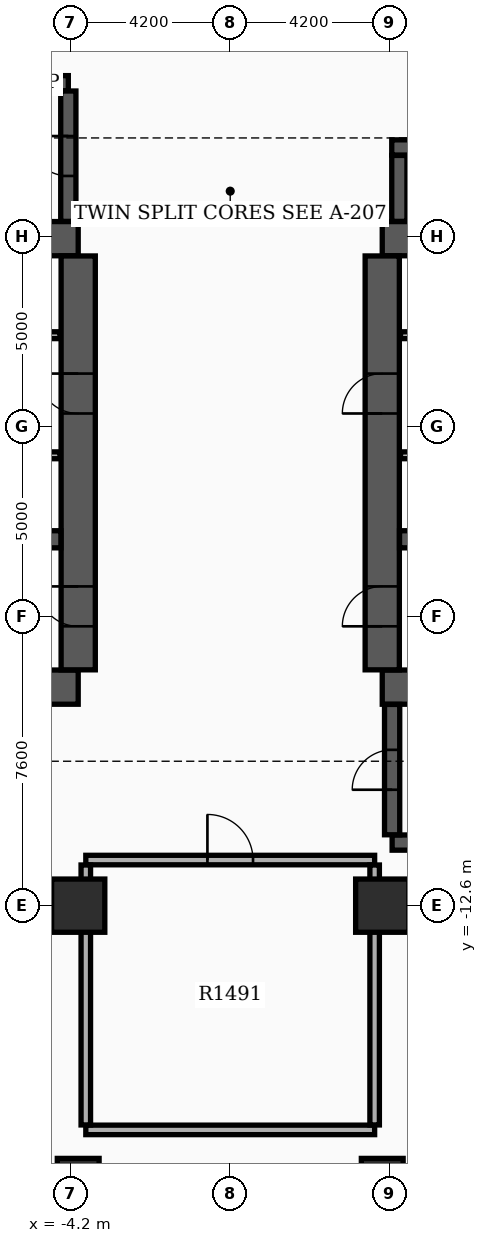
"""IFC4 building model, lengths in metres.
Left out: names, types, materials, properties, quantities, classifications, styles, units other than length and angle.
Written with IfcOpenShell. Run it as: python <this file> out.ifc"""

import sys

from ifc_helpers import new_model, si_unit, direction, frame, frame_2d, origin, origin_2d, place, context, subcontext, project, spatial, rectangle, extrude, element, fill, save


model = new_model("IFC4")
c1 = context("Model", 3, precision=1e-05, world=origin(), true_north=direction((0.0, 1.0)))
c2 = subcontext(c1, "Body", "Model", "MODEL_VIEW")
j1 = project(units=[si_unit("LENGTHUNIT", "METRE"), si_unit("PLANEANGLEUNIT", "RADIAN")], contexts=[c1])
p1 = place(None, origin())
s1 = spatial("IfcSite", under=j1, at=p1, CompositionType="ELEMENT")
p2 = place(p1, origin())
s2 = spatial("IfcBuilding", under=s1, at=p2, CompositionType="ELEMENT")
p3 = place(p2, frame((0.0, 0.0, 95.1)))
s3 = spatial("IfcBuildingStorey", under=s2, at=p3, CompositionType="ELEMENT", Elevation=95.1)
for number, where, z_axis, x_axis in (
    (1, (-12.4, -6.85, 0.0), (0.0, 0.0, 1.0), (1.0, 0.0, 0.0)),
    (2, (-12.4, 4.95, 0.0), (0.0, 0.0, 1.0), (1.0, 0.0, 0.0)),
):
    element("IfcWall", number, at=place(p3, frame(where, z_axis=z_axis, x_axis=x_axis)), inside=s3, PredefinedType="SHEAR", context=c2, shape_type="SweptSolid", body=[
        extrude(rectangle(XDim=8.4, YDim=0.9, at=frame_2d((4.2, 0.0))), origin(), (0.0, 0.0, 1.0), 4.85),
    ])
p4 = place(p3, frame((-4.0, -6.395, 0.0), z_axis=(0.0, 0.0, 1.0), x_axis=(0.0, 1.0, 0.0)))
e3 = element("IfcWall", 3, at=p4, inside=s3, PredefinedType="SHEAR", context=c2, shape_type="SweptSolid", body=[
    extrude(rectangle(XDim=10.89, YDim=0.9, at=frame_2d((5.445, 0.0))), origin(), (0.0, 0.0, 1.0), 4.85),
])
p5 = place(p4, frame((1.145, 0.0, 0.0)))
e4 = element("IfcOpeningElement", 4, at=p5, cuts=e3, PredefinedType="OPENING", context=c2, shape_type="SweptSolid", body=[
    extrude(rectangle(XDim=1.05, YDim=2.15, at=frame_2d((0.525, 1.075))), frame((0.0, 0.46, 0.0), z_axis=(0.0, -1.0, 0.0), x_axis=(1.0, 0.0, 0.0)), (0.0, 0.0, 1.0), 0.92),
])
p6 = place(p4, frame((6.745, 0.0, 0.0)))
e5 = element("IfcOpeningElement", 5, at=p6, cuts=e3, PredefinedType="OPENING", context=c2, shape_type="SweptSolid", body=[
    extrude(rectangle(XDim=1.05, YDim=2.15, at=frame_2d((0.525, 1.075))), frame((0.0, 0.46, 0.0), z_axis=(0.0, -1.0, 0.0), x_axis=(1.0, 0.0, 0.0)), (0.0, 0.0, 1.0), 0.92),
])
p7 = place(p3, frame((-11.945, -2.96, 0.0), z_axis=(0.0, 0.0, 1.0), x_axis=(1.0, 0.0, 0.0)))
e6 = element("IfcWall", 6, at=p7, inside=s3, PredefinedType="SHEAR", context=c2, shape_type="SweptSolid", body=[
    extrude(rectangle(XDim=7.49, YDim=0.45, at=frame_2d((3.745, 0.0))), origin(), (0.0, 0.0, 1.0), 4.85),
])
for number, where, z_axis, x_axis in (
    (7, (4.0, -6.85, 0.0), (0.0, 0.0, 1.0), (1.0, 0.0, 0.0)),
    (8, (4.0, 4.95, 0.0), (0.0, 0.0, 1.0), (1.0, 0.0, 0.0)),
):
    element("IfcWall", number, at=place(p3, frame(where, z_axis=z_axis, x_axis=x_axis)), inside=s3, PredefinedType="SHEAR", context=c2, shape_type="SweptSolid", body=[
        extrude(rectangle(XDim=8.4, YDim=0.9, at=frame_2d((4.2, 0.0))), origin(), (0.0, 0.0, 1.0), 4.85),
    ])
p8 = place(p3, frame((4.0, -6.395, 0.0), z_axis=(0.0, 0.0, 1.0), x_axis=(0.0, 1.0, 0.0)))
e9 = element("IfcWall", 9, at=p8, inside=s3, PredefinedType="SHEAR", context=c2, shape_type="SweptSolid", body=[
    extrude(rectangle(XDim=10.89, YDim=0.9, at=frame_2d((5.445, 0.0))), origin(), (0.0, 0.0, 1.0), 4.85),
])
p9 = place(p8, frame((1.145, 0.0, 0.0)))
e10 = element("IfcOpeningElement", 10, at=p9, cuts=e9, PredefinedType="OPENING", context=c2, shape_type="SweptSolid", body=[
    extrude(rectangle(XDim=1.05, YDim=2.15, at=frame_2d((0.525, 1.075))), frame((0.0, 0.46, 0.0), z_axis=(0.0, -1.0, 0.0), x_axis=(1.0, 0.0, 0.0)), (0.0, 0.0, 1.0), 0.92),
])
p10 = place(p8, frame((6.745, 0.0, 0.0)))
e11 = element("IfcOpeningElement", 11, at=p10, cuts=e9, PredefinedType="OPENING", context=c2, shape_type="SweptSolid", body=[
    extrude(rectangle(XDim=1.05, YDim=2.15, at=frame_2d((0.525, 1.075))), frame((0.0, 0.46, 0.0), z_axis=(0.0, -1.0, 0.0), x_axis=(1.0, 0.0, 0.0)), (0.0, 0.0, 1.0), 0.92),
])
p11 = place(p3, frame((4.455, -2.96, 0.0), z_axis=(0.0, 0.0, 1.0), x_axis=(1.0, 0.0, 0.0)))
e12 = element("IfcWall", 12, at=p11, inside=s3, PredefinedType="SHEAR", context=c2, shape_type="SweptSolid", body=[
    extrude(rectangle(XDim=7.49, YDim=0.45, at=frame_2d((3.745, 0.0))), origin(), (0.0, 0.0, 1.0), 4.85),
])
p12 = place(p3, frame((-12.22, 9.04, 0.0), z_axis=(0.0, 0.0, 1.0), x_axis=(1.0, 0.0, 0.0)))
e13 = element("IfcWall", 13, at=p12, inside=s3, PredefinedType="SHEAR", context=c2, shape_type="SweptSolid", body=[
    extrude(rectangle(XDim=7.96, YDim=0.4, at=frame_2d((3.98, 0.0))), origin(), (0.0, 0.0, 1.0), 4.85),
])
p13 = place(p3, frame((-4.26, 5.405, 0.0), z_axis=(0.0, 0.0, 1.0), x_axis=(0.0, 1.0, 0.0)))
e14 = element("IfcWall", 14, at=p13, inside=s3, PredefinedType="SHEAR", context=c2, shape_type="SweptSolid", body=[
    extrude(rectangle(XDim=3.43, YDim=0.4, at=frame_2d((1.715, 0.0))), origin(), (0.0, 0.0, 1.0), 4.85),
])
p14 = place(p13, frame((1.195, 0.0, 0.0)))
e15 = element("IfcOpeningElement", 15, at=p14, cuts=e14, PredefinedType="OPENING", context=c2, shape_type="SweptSolid", body=[
    extrude(rectangle(XDim=1.05, YDim=2.15, at=frame_2d((0.525, 1.075))), frame((0.0, 0.21, 0.0), z_axis=(0.0, -1.0, 0.0), x_axis=(1.0, 0.0, 0.0)), (0.0, 0.0, 1.0), 0.42),
])
p15 = place(p3, frame((4.26, -10.94, 0.0), z_axis=(0.0, 0.0, 1.0), x_axis=(1.0, 0.0, 0.0)))
e16 = element("IfcWall", 16, at=p15, inside=s3, PredefinedType="SHEAR", context=c2, shape_type="SweptSolid", body=[
    extrude(rectangle(XDim=7.96, YDim=0.4, at=frame_2d((3.98, 0.0))), origin(), (0.0, 0.0, 1.0), 4.85),
])
p16 = place(p3, frame((4.26, -10.735, 0.0), z_axis=(0.0, 0.0, 1.0), x_axis=(0.0, 1.0, 0.0)))
e17 = element("IfcWall", 17, at=p16, inside=s3, PredefinedType="SHEAR", context=c2, shape_type="SweptSolid", body=[
    extrude(rectangle(XDim=3.43, YDim=0.4, at=frame_2d((1.715, 0.0))), origin(), (0.0, 0.0, 1.0), 4.85),
])
p17 = place(p16, frame((1.185, 0.0, 0.0)))
e18 = element("IfcOpeningElement", 18, at=p17, cuts=e17, PredefinedType="OPENING", context=c2, shape_type="SweptSolid", body=[
    extrude(rectangle(XDim=1.05, YDim=2.15, at=frame_2d((0.525, 1.075))), frame((0.0, 0.21, 0.0), z_axis=(0.0, -1.0, 0.0), x_axis=(1.0, 0.0, 0.0)), (0.0, 0.0, 1.0), 0.42),
])
p18 = place(p3, frame((4.45, 5.405, 0.0), z_axis=(0.0, 0.0, 1.0), x_axis=(0.0, 1.0, 0.0)))
e19 = element("IfcWall", 19, at=p18, inside=s3, PredefinedType="SHEAR", context=c2, shape_type="SweptSolid", body=[
    extrude(rectangle(XDim=1.735, YDim=0.4, at=frame_2d((0.867, 0.0))), origin(), (0.0, 0.0, 1.0), 4.85),
])
p19 = place(p3, frame((4.25, 7.35, 0.0), z_axis=(0.0, 0.0, 1.0), x_axis=(1.0, 0.0, 0.0)))
e20 = element("IfcWall", 20, at=p19, inside=s3, PredefinedType="SHEAR", context=c2, shape_type="SweptSolid", body=[
    extrude(rectangle(XDim=5.4, YDim=0.4, at=frame_2d((2.7, 0.0))), origin(), (0.0, 0.0, 1.0), 4.85),
])
p20 = place(p19, frame((0.85, 0.0, 0.0)))
e21 = element("IfcOpeningElement", 21, at=p20, cuts=e20, PredefinedType="OPENING", context=c2, shape_type="SweptSolid", body=[
    extrude(rectangle(XDim=1.2, YDim=2.2, at=frame_2d((0.6, 1.1))), frame((0.0, 0.21, 0.0), z_axis=(0.0, -1.0, 0.0), x_axis=(1.0, 0.0, 0.0)), (0.0, 0.0, 1.0), 0.42),
])
p21 = place(p19, frame((3.25, 0.0, 0.0)))
e22 = element("IfcOpeningElement", 22, at=p21, cuts=e20, PredefinedType="OPENING", context=c2, shape_type="SweptSolid", body=[
    extrude(rectangle(XDim=1.2, YDim=2.2, at=frame_2d((0.6, 1.1))), frame((0.0, 0.21, 0.0), z_axis=(0.0, -1.0, 0.0), x_axis=(1.0, 0.0, 0.0)), (0.0, 0.0, 1.0), 0.42),
])
for number, where, z_axis, x_axis in (
    (23, (-4.0, -12.6, 0.0), (0.0, 0.0, 1.0), (1.0, 0.0, 0.0)),
    (24, (4.0, -12.6, 0.0), (0.0, 0.0, 1.0), (1.0, 0.0, 0.0)),
):
    element("IfcColumn", number, at=place(p3, frame(where, z_axis=z_axis, x_axis=x_axis)), inside=s3, PredefinedType="COLUMN", context=c2, shape_type="SweptSolid", body=[
        extrude(rectangle(XDim=1.4, YDim=1.4, at=origin_2d()), origin(), (0.0, 0.0, 1.0), 5.1),
    ])
for number, where, z_axis, x_axis in (
    (25, (-4.0, -19.8, 0.0), (0.0, 0.0, 1.0), (1.0, 0.0, 0.0)),
    (26, (4.0, -19.8, 0.0), (0.0, 0.0, 1.0), (1.0, 0.0, 0.0)),
):
    element("IfcColumn", number, at=place(p3, frame(where, z_axis=z_axis, x_axis=x_axis)), inside=s3, PredefinedType="COLUMN", context=c2, shape_type="SweptSolid", body=[
        extrude(rectangle(XDim=1.1, YDim=1.1, at=origin_2d()), origin(), (0.0, 0.0, 1.0), 5.1),
    ])
p22 = place(p3, frame((-11.9, 2.41, 0.0), z_axis=(0.0, 0.0, 1.0), x_axis=(1.0, 0.0, 0.0)))
e27 = element("IfcWall", 27, at=p22, inside=s3, PredefinedType="SOLIDWALL", context=c2, shape_type="SweptSolid", body=[
    extrude(rectangle(XDim=7.42, YDim=0.18, at=frame_2d((3.71, 0.0))), origin(), (0.0, 0.0, 1.0), 3.92),
])
p23 = place(p22, frame((0.55, 0.0, 0.0)))
e28 = element("IfcOpeningElement", 28, at=p23, cuts=e27, PredefinedType="OPENING", context=c2, shape_type="SweptSolid", body=[
    extrude(rectangle(XDim=1.1, YDim=2.15, at=frame_2d((0.55, 1.075))), frame((0.0, 0.1, 0.0), z_axis=(0.0, -1.0, 0.0), x_axis=(1.0, 0.0, 0.0)), (0.0, 0.0, 1.0), 0.2),
])
p24 = place(p22, frame((3.85, 0.0, 0.0)))
e29 = element("IfcOpeningElement", 29, at=p24, cuts=e27, PredefinedType="OPENING", context=c2, shape_type="SweptSolid", body=[
    extrude(rectangle(XDim=1.1, YDim=2.15, at=frame_2d((0.55, 1.075))), frame((0.0, 0.1, 0.0), z_axis=(0.0, -1.0, 0.0), x_axis=(1.0, 0.0, 0.0)), (0.0, 0.0, 1.0), 0.2),
])
p25 = place(p22, frame((5.75, 0.0, 0.0)))
e30 = element("IfcOpeningElement", 30, at=p25, cuts=e27, PredefinedType="OPENING", context=c2, shape_type="SweptSolid", body=[
    extrude(rectangle(XDim=1.1, YDim=2.15, at=frame_2d((0.55, 1.075))), frame((0.0, 0.1, 0.0), z_axis=(0.0, -1.0, 0.0), x_axis=(1.0, 0.0, 0.0)), (0.0, 0.0, 1.0), 0.2),
])
p26 = place(p3, frame((4.48, 2.41, 0.0), z_axis=(0.0, 0.0, 1.0), x_axis=(1.0, 0.0, 0.0)))
e31 = element("IfcWall", 31, at=p26, inside=s3, PredefinedType="SOLIDWALL", context=c2, shape_type="SweptSolid", body=[
    extrude(rectangle(XDim=7.42, YDim=0.18, at=frame_2d((3.71, 0.0))), origin(), (0.0, 0.0, 1.0), 3.92),
])
p27 = place(p26, frame((5.67, 0.0, 0.0)))
e32 = element("IfcOpeningElement", 32, at=p27, cuts=e31, PredefinedType="OPENING", context=c2, shape_type="SweptSolid", body=[
    extrude(rectangle(XDim=1.1, YDim=2.15, at=frame_2d((0.55, 1.075))), frame((0.0, 0.1, 0.0), z_axis=(0.0, -1.0, 0.0), x_axis=(1.0, 0.0, 0.0)), (0.0, 0.0, 1.0), 0.2),
])
p28 = place(p26, frame((0.52, 0.0, 0.0)))
e33 = element("IfcOpeningElement", 33, at=p28, cuts=e31, PredefinedType="OPENING", context=c2, shape_type="SweptSolid", body=[
    extrude(rectangle(XDim=1.1, YDim=2.15, at=frame_2d((0.55, 1.075))), frame((0.0, 0.1, 0.0), z_axis=(0.0, -1.0, 0.0), x_axis=(1.0, 0.0, 0.0)), (0.0, 0.0, 1.0), 0.2),
])
p29 = place(p26, frame((2.42, 0.0, 0.0)))
e34 = element("IfcOpeningElement", 34, at=p29, cuts=e31, PredefinedType="OPENING", context=c2, shape_type="SweptSolid", body=[
    extrude(rectangle(XDim=1.1, YDim=2.15, at=frame_2d((0.55, 1.075))), frame((0.0, 0.1, 0.0), z_axis=(0.0, -1.0, 0.0), x_axis=(1.0, 0.0, 0.0)), (0.0, 0.0, 1.0), 0.2),
])
p30 = place(p3, frame((-11.9, -0.75, 0.0), z_axis=(0.0, 0.0, 1.0), x_axis=(1.0, 0.0, 0.0)))
e35 = element("IfcWall", 35, at=p30, inside=s3, PredefinedType="SOLIDWALL", context=c2, shape_type="SweptSolid", body=[
    extrude(rectangle(XDim=7.42, YDim=0.18, at=frame_2d((3.71, 0.0))), origin(), (0.0, 0.0, 1.0), 3.92),
])
p31 = place(p30, frame((0.45, 0.0, 0.0)))
e36 = element("IfcOpeningElement", 36, at=p31, cuts=e35, PredefinedType="OPENING", context=c2, shape_type="SweptSolid", body=[
    extrude(rectangle(XDim=1.1, YDim=2.15, at=frame_2d((0.55, 1.075))), frame((0.0, 0.1, 0.0), z_axis=(0.0, -1.0, 0.0), x_axis=(1.0, 0.0, 0.0)), (0.0, 0.0, 1.0), 0.2),
])
p32 = place(p30, frame((2.35, 0.0, 0.0)))
e37 = element("IfcOpeningElement", 37, at=p32, cuts=e35, PredefinedType="OPENING", context=c2, shape_type="SweptSolid", body=[
    extrude(rectangle(XDim=1.1, YDim=2.15, at=frame_2d((0.55, 1.075))), frame((0.0, 0.1, 0.0), z_axis=(0.0, -1.0, 0.0), x_axis=(1.0, 0.0, 0.0)), (0.0, 0.0, 1.0), 0.2),
])
p33 = place(p30, frame((5.75, 0.0, 0.0)))
e38 = element("IfcOpeningElement", 38, at=p33, cuts=e35, PredefinedType="OPENING", context=c2, shape_type="SweptSolid", body=[
    extrude(rectangle(XDim=1.1, YDim=2.15, at=frame_2d((0.55, 1.075))), frame((0.0, 0.1, 0.0), z_axis=(0.0, -1.0, 0.0), x_axis=(1.0, 0.0, 0.0)), (0.0, 0.0, 1.0), 0.2),
])
p34 = place(p3, frame((4.48, -0.75, 0.0), z_axis=(0.0, 0.0, 1.0), x_axis=(1.0, 0.0, 0.0)))
e39 = element("IfcWall", 39, at=p34, inside=s3, PredefinedType="SOLIDWALL", context=c2, shape_type="SweptSolid", body=[
    extrude(rectangle(XDim=7.42, YDim=0.18, at=frame_2d((3.71, 0.0))), origin(), (0.0, 0.0, 1.0), 3.92),
])
p35 = place(p34, frame((0.52, 0.0, 0.0)))
e40 = element("IfcOpeningElement", 40, at=p35, cuts=e39, PredefinedType="OPENING", context=c2, shape_type="SweptSolid", body=[
    extrude(rectangle(XDim=1.1, YDim=2.15, at=frame_2d((0.55, 1.075))), frame((0.0, 0.1, 0.0), z_axis=(0.0, -1.0, 0.0), x_axis=(1.0, 0.0, 0.0)), (0.0, 0.0, 1.0), 0.2),
])
p36 = place(p34, frame((3.92, 0.0, 0.0)))
e41 = element("IfcOpeningElement", 41, at=p36, cuts=e39, PredefinedType="OPENING", context=c2, shape_type="SweptSolid", body=[
    extrude(rectangle(XDim=1.1, YDim=2.15, at=frame_2d((0.55, 1.075))), frame((0.0, 0.1, 0.0), z_axis=(0.0, -1.0, 0.0), x_axis=(1.0, 0.0, 0.0)), (0.0, 0.0, 1.0), 0.2),
])
p37 = place(p34, frame((5.82, 0.0, 0.0)))
e42 = element("IfcOpeningElement", 42, at=p37, cuts=e39, PredefinedType="OPENING", context=c2, shape_type="SweptSolid", body=[
    extrude(rectangle(XDim=1.1, YDim=2.15, at=frame_2d((0.55, 1.075))), frame((0.0, 0.1, 0.0), z_axis=(0.0, -1.0, 0.0), x_axis=(1.0, 0.0, 0.0)), (0.0, 0.0, 1.0), 0.2),
])
p38 = place(p3, frame((-3.8, -18.5, 0.0), z_axis=(0.0, 0.0, 1.0), x_axis=(1.0, 0.0, 0.0)))
e43 = element("IfcWall", 43, at=p38, inside=s3, PredefinedType="SOLIDWALL", context=c2, shape_type="SweptSolid", body=[
    extrude(rectangle(XDim=7.6, YDim=0.25, at=frame_2d((3.8, 0.0))), origin(), (0.0, 0.0, 1.0), 3.92),
])
p39 = place(p3, frame((-3.8, -11.4, 0.0), z_axis=(0.0, 0.0, 1.0), x_axis=(1.0, 0.0, 0.0)))
e44 = element("IfcWall", 44, at=p39, inside=s3, PredefinedType="SOLIDWALL", context=c2, shape_type="SweptSolid", body=[
    extrude(rectangle(XDim=7.6, YDim=0.25, at=frame_2d((3.8, 0.0))), origin(), (0.0, 0.0, 1.0), 3.92),
])
p40 = place(p39, frame((3.2, 0.0, 0.0)))
e45 = element("IfcOpeningElement", 45, at=p40, cuts=e44, PredefinedType="OPENING", context=c2, shape_type="SweptSolid", body=[
    extrude(rectangle(XDim=1.2, YDim=2.15, at=frame_2d((0.6, 1.075))), frame((0.0, 0.135, 0.0), z_axis=(0.0, -1.0, 0.0), x_axis=(1.0, 0.0, 0.0)), (0.0, 0.0, 1.0), 0.27),
])
for number, where, z_axis, x_axis in (
    (46, (-3.8, -18.37, 0.0), (0.0, 0.0, 1.0), (0.0, 1.0, 0.0)),
    (47, (3.8, -18.37, 0.0), (0.0, 0.0, 1.0), (0.0, 1.0, 0.0)),
):
    element("IfcWall", number, at=place(p3, frame(where, z_axis=z_axis, x_axis=x_axis)), inside=s3, PredefinedType="SOLIDWALL", context=c2, shape_type="SweptSolid", body=[
        extrude(rectangle(XDim=6.84, YDim=0.25, at=frame_2d((3.42, 0.0))), origin(), (0.0, 0.0, 1.0), 3.92),
    ])
p41 = place(p5, origin())
e48 = element("IfcDoor", 48, at=p41, inside=s3, OperationType="SINGLE_SWING_RIGHT", PredefinedType="DOOR", context=c2, shape_type="SweptSolid", body=[
    extrude(rectangle(XDim=1.05, YDim=2.15, at=frame_2d((0.525, 1.075))), frame((0.0, 0.025, 0.0), z_axis=(0.0, -1.0, 0.0), x_axis=(1.0, 0.0, 0.0)), (0.0, 0.0, 1.0), 0.05),
])
fill(e4, e48)
p42 = place(p9, origin())
e49 = element("IfcDoor", 49, at=p42, inside=s3, OperationType="SINGLE_SWING_LEFT", PredefinedType="DOOR", context=c2, shape_type="SweptSolid", body=[
    extrude(rectangle(XDim=1.05, YDim=2.15, at=frame_2d((0.525, 1.075))), frame((0.0, 0.025, 0.0), z_axis=(0.0, -1.0, 0.0), x_axis=(1.0, 0.0, 0.0)), (0.0, 0.0, 1.0), 0.05),
])
fill(e10, e49)
p43 = place(p6, origin())
e50 = element("IfcDoor", 50, at=p43, inside=s3, OperationType="SINGLE_SWING_RIGHT", PredefinedType="DOOR", context=c2, shape_type="SweptSolid", body=[
    extrude(rectangle(XDim=1.05, YDim=2.15, at=frame_2d((0.525, 1.075))), frame((0.0, 0.025, 0.0), z_axis=(0.0, -1.0, 0.0), x_axis=(1.0, 0.0, 0.0)), (0.0, 0.0, 1.0), 0.05),
])
fill(e5, e50)
p44 = place(p10, origin())
e51 = element("IfcDoor", 51, at=p44, inside=s3, OperationType="SINGLE_SWING_LEFT", PredefinedType="DOOR", context=c2, shape_type="SweptSolid", body=[
    extrude(rectangle(XDim=1.05, YDim=2.15, at=frame_2d((0.525, 1.075))), frame((0.0, 0.025, 0.0), z_axis=(0.0, -1.0, 0.0), x_axis=(1.0, 0.0, 0.0)), (0.0, 0.0, 1.0), 0.05),
])
fill(e11, e51)
p45 = place(p14, origin())
e52 = element("IfcDoor", 52, at=p45, inside=s3, OperationType="SINGLE_SWING_RIGHT", PredefinedType="DOOR", context=c2, shape_type="SweptSolid", body=[
    extrude(rectangle(XDim=1.05, YDim=2.15, at=frame_2d((0.525, 1.075))), frame((0.0, 0.025, 0.0), z_axis=(0.0, -1.0, 0.0), x_axis=(1.0, 0.0, 0.0)), (0.0, 0.0, 1.0), 0.05),
])
fill(e15, e52)
p46 = place(p17, origin())
e53 = element("IfcDoor", 53, at=p46, inside=s3, OperationType="SINGLE_SWING_LEFT", PredefinedType="DOOR", context=c2, shape_type="SweptSolid", body=[
    extrude(rectangle(XDim=1.05, YDim=2.15, at=frame_2d((0.525, 1.075))), frame((0.0, 0.025, 0.0), z_axis=(0.0, -1.0, 0.0), x_axis=(1.0, 0.0, 0.0)), (0.0, 0.0, 1.0), 0.05),
])
fill(e18, e53)
p47 = place(p40, origin())
e54 = element("IfcDoor", 54, at=p47, inside=s3, OperationType="SINGLE_SWING_LEFT", PredefinedType="DOOR", context=c2, shape_type="SweptSolid", body=[
    extrude(rectangle(XDim=1.2, YDim=2.15, at=frame_2d((0.6, 1.075))), frame((0.0, 0.025, 0.0), z_axis=(0.0, -1.0, 0.0), x_axis=(1.0, 0.0, 0.0)), (0.0, 0.0, 1.0), 0.05),
])
fill(e45, e54)
save(model, sys.argv[1])
